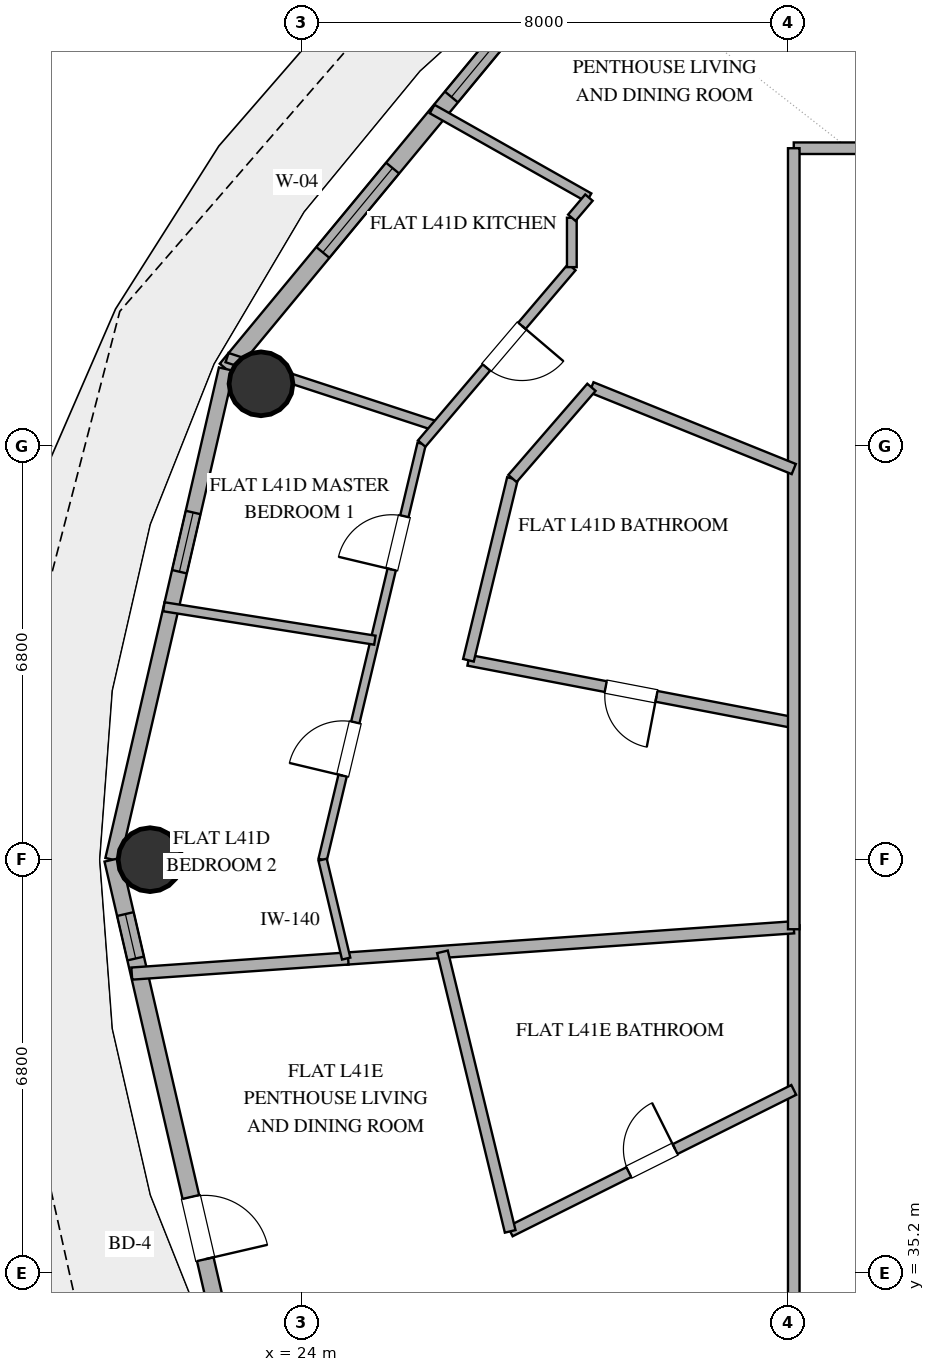
"""IFC4 building model, lengths in metres.
Left out: names, types, materials, properties, quantities, classifications, styles, units other than length and angle.
Written with IfcOpenShell. Run it as: python <this file> out.ifc"""

import sys

from ifc_helpers import new_model, si_unit, direction, frame, frame_2d, origin, origin_2d, place, context, subcontext, project, spatial, rectangle, hollow_circle, extrude, element, fill, save


model = new_model("IFC4")
c1 = context("Model", 3, precision=1e-05, world=origin(), true_north=direction((0.0, 1.0)))
c2 = subcontext(c1, "Body", "Model", "MODEL_VIEW")
j1 = project(units=[si_unit("LENGTHUNIT", "METRE"), si_unit("PLANEANGLEUNIT", "RADIAN")], contexts=[c1])
p1 = place(None, origin())
s1 = spatial("IfcSite", under=j1, at=p1, CompositionType="ELEMENT")
p2 = place(p1, origin())
s2 = spatial("IfcBuilding", under=s1, at=p2, CompositionType="ELEMENT")
p3 = place(p2, frame((0.0, 0.0, 165.0)))
s3 = spatial("IfcBuildingStorey", under=s2, at=p3, CompositionType="ELEMENT", Elevation=165.0)
for number, where, z_axis, x_axis in (
    (1, (23.338, 49.826, 0.0), (0.0, 0.0, 1.0), (1.0, 0.0, 0.0)),
    (2, (21.513, 42.0, 0.0), (0.0, 0.0, 1.0), (1.0, 0.0, 0.0)),
):
    element("IfcColumn", number, at=place(p3, frame(where, z_axis=z_axis, x_axis=x_axis)), inside=s3, PredefinedType="COLUMN", context=c2, shape_type="SweptSolid", body=[
        extrude(hollow_circle(Radius=0.525, WallThickness=0.028, at=origin_2d()), origin(), (0.0, 0.0, 1.0), 3.38),
    ])
p4 = place(p3, frame((28.424, 56.906, 0.0), z_axis=(0.0, 0.0, 1.0), x_axis=(-0.637333477683, -0.770588111915, 0.0)))
e3 = element("IfcWall", 3, at=p4, inside=s3, PredefinedType="SOLIDWALL", context=c2, shape_type="SweptSolid", body=[
    extrude(rectangle(XDim=8.875, YDim=0.28, at=frame_2d((4.438, 0.0))), origin(), (0.0, 0.0, 1.0), 3.38),
])
p5 = place(p4, frame((1.566, 0.0, 0.85)))
e4 = element("IfcOpeningElement", 4, at=p5, cuts=e3, PredefinedType="OPENING", context=c2, shape_type="SweptSolid", body=[
    extrude(rectangle(XDim=1.5, YDim=2.0, at=frame_2d((0.75, 1.0))), frame((0.0, 0.15, 0.0), z_axis=(0.0, -1.0, 0.0), x_axis=(1.0, 0.0, 0.0)), (0.0, 0.0, 1.0), 0.3),
])
p6 = place(p4, frame((4.584, 0.0, 0.85)))
e5 = element("IfcOpeningElement", 5, at=p6, cuts=e3, PredefinedType="OPENING", context=c2, shape_type="SweptSolid", body=[
    extrude(rectangle(XDim=1.8, YDim=2.2, at=frame_2d((0.9, 1.1))), frame((0.0, 0.15, 0.0), z_axis=(0.0, -1.0, 0.0), x_axis=(1.0, 0.0, 0.0)), (0.0, 0.0, 1.0), 0.3),
])
p7 = place(p3, frame((22.768, 50.067, 0.0), z_axis=(0.0, 0.0, 1.0), x_axis=(-0.225473184558, -0.974249374157, 0.0)))
e6 = element("IfcWall", 6, at=p7, inside=s3, PredefinedType="SOLIDWALL", context=c2, shape_type="SweptSolid", body=[
    extrude(rectangle(XDim=8.28, YDim=0.25, at=frame_2d((4.14, 0.0))), origin(), (0.0, 0.0, 1.0), 3.38),
])
p8 = place(p7, frame((2.42, 0.0, 0.35)))
e7 = element("IfcOpeningElement", 7, at=p8, cuts=e6, PredefinedType="OPENING", context=c2, shape_type="SweptSolid", body=[
    extrude(rectangle(XDim=1.0, YDim=1.05, at=frame_2d((0.5, 0.525))), frame((0.0, 0.135, 0.0), z_axis=(0.0, -1.0, 0.0), x_axis=(1.0, 0.0, 0.0)), (0.0, 0.0, 1.0), 0.27),
])
p9 = place(p3, frame((20.901, 42.0, 0.0), z_axis=(0.0, 0.0, 1.0), x_axis=(0.225473184558, -0.974249374157, 0.0)))
e8 = element("IfcWall", 8, at=p9, inside=s3, PredefinedType="SOLIDWALL", context=c2, shape_type="SweptSolid", body=[
    extrude(rectangle(XDim=8.28, YDim=0.28, at=frame_2d((4.14, 0.0))), origin(), (0.0, 0.0, 1.0), 3.38),
])
p10 = place(p9, frame((5.694, 0.0, 0.0)))
e9 = element("IfcOpeningElement", 9, at=p10, cuts=e8, PredefinedType="OPENING", context=c2, shape_type="SweptSolid", body=[
    extrude(rectangle(XDim=1.05, YDim=2.2, at=frame_2d((0.525, 1.1))), frame((0.0, 0.15, 0.0), z_axis=(0.0, -1.0, 0.0), x_axis=(1.0, 0.0, 0.0)), (0.0, 0.0, 1.0), 0.3),
])
p11 = place(p9, frame((0.918, 0.0, 0.85)))
e10 = element("IfcOpeningElement", 10, at=p11, cuts=e8, PredefinedType="OPENING", context=c2, shape_type="SweptSolid", body=[
    extrude(rectangle(XDim=0.75, YDim=1.8, at=frame_2d((0.375, 0.9))), frame((0.0, 0.15, 0.0), z_axis=(0.0, -1.0, 0.0), x_axis=(1.0, 0.0, 0.0)), (0.0, 0.0, 1.0), 0.3),
])
p12 = place(p3, frame((32.1, 53.7, 0.0), z_axis=(0.0, 0.0, 1.0), x_axis=(1.0, 0.0, 0.0)))
e11 = element("IfcWall", 11, at=p12, inside=s3, PredefinedType="PARTITIONING", context=c2, shape_type="SweptSolid", body=[
    extrude(rectangle(XDim=19.477, YDim=0.19, at=frame_2d((9.738, 0.0))), origin(), (0.0, 0.0, 1.0), 2.74),
])
p13 = place(p12, frame((9.923, 0.0, 0.0)))
e12 = element("IfcOpeningElement", 12, at=p13, cuts=e11, PredefinedType="OPENING", context=c2, shape_type="SweptSolid", body=[
    extrude(rectangle(XDim=1.0, YDim=2.2, at=frame_2d((0.5, 1.1))), frame((0.0, 0.105, 0.0), z_axis=(0.0, -1.0, 0.0), x_axis=(1.0, 0.0, 0.0)), (0.0, 0.0, 1.0), 0.21),
])
p14 = place(p12, frame((2.204, 0.0, 0.0)))
e13 = element("IfcOpeningElement", 13, at=p14, cuts=e11, PredefinedType="OPENING", context=c2, shape_type="SweptSolid", body=[
    extrude(rectangle(XDim=1.0, YDim=2.2, at=frame_2d((0.5, 1.1))), frame((0.0, 0.105, 0.0), z_axis=(0.0, -1.0, 0.0), x_axis=(1.0, 0.0, 0.0)), (0.0, 0.0, 1.0), 0.21),
])
p15 = place(p3, frame((32.1, 30.3, 0.0), z_axis=(0.0, 0.0, 1.0), x_axis=(0.0, 1.0, 0.0)))
e14 = element("IfcWall", 14, at=p15, inside=s3, PredefinedType="PARTITIONING", context=c2, shape_type="SweptSolid", body=[
    extrude(rectangle(XDim=10.62, YDim=0.19, at=frame_2d((5.31, 0.0))), origin(), (0.0, 0.0, 1.0), 2.74),
])
p16 = place(p15, frame((3.475, 0.0, 0.0)))
e15 = element("IfcOpeningElement", 15, at=p16, cuts=e14, PredefinedType="OPENING", context=c2, shape_type="SweptSolid", body=[
    extrude(rectangle(XDim=1.0, YDim=2.2, at=frame_2d((0.5, 1.1))), frame((0.0, 0.105, 0.0), z_axis=(0.0, -1.0, 0.0), x_axis=(1.0, 0.0, 0.0)), (0.0, 0.0, 1.0), 0.21),
])
p17 = place(p3, frame((37.465, 53.7, 0.0), z_axis=(0.0, 0.0, 1.0), x_axis=(-0.669128292476, 0.7431469089, 0.0)))
e16 = element("IfcWall", 16, at=p17, inside=s3, PredefinedType="PARTITIONING", context=c2, shape_type="SweptSolid", body=[
    extrude(rectangle(XDim=7.339, YDim=0.2, at=frame_2d((3.669, 0.0))), origin(), (0.0, 0.0, 1.0), 2.74),
])
p18 = place(p3, frame((32.1, 40.888, 0.0), z_axis=(0.0, 0.0, 1.0), x_axis=(-0.997562906323, -0.069772830877, 0.0)))
e17 = element("IfcWall", 17, at=p18, inside=s3, PredefinedType="PARTITIONING", context=c2, shape_type="SweptSolid", body=[
    extrude(rectangle(XDim=7.38, YDim=0.2, at=frame_2d((3.69, 0.0))), origin(), (0.0, 0.0, 1.0), 2.74),
])
p19 = place(p3, frame((32.1, 44.253, 0.0), z_axis=(0.0, 0.0, 1.0), x_axis=(-0.982102846986, 0.188345421878, 0.0)))
e18 = element("IfcWall", 18, at=p19, inside=s3, PredefinedType="PLUMBINGWALL", context=c2, shape_type="SweptSolid", body=[
    extrude(rectangle(XDim=5.448, YDim=0.18, at=frame_2d((2.724, 0.0))), origin(), (0.0, 0.0, 1.0), 2.74),
])
p20 = place(p19, frame((2.299, 0.0, 0.0)))
e19 = element("IfcOpeningElement", 19, at=p20, cuts=e18, PredefinedType="OPENING", context=c2, shape_type="SweptSolid", body=[
    extrude(rectangle(XDim=0.85, YDim=2.1, at=frame_2d((0.425, 1.05))), frame((0.0, 0.1, 0.0), z_axis=(0.0, -1.0, 0.0), x_axis=(1.0, 0.0, 0.0)), (0.0, 0.0, 1.0), 0.2),
])
p21 = place(p3, frame((32.1, 40.856, 0.0), z_axis=(0.0, 0.0, 1.0), x_axis=(0.0, 1.0, 0.0)))
e20 = element("IfcWall", 20, at=p21, inside=s3, PredefinedType="PARTITIONING", context=c2, shape_type="SweptSolid", body=[
    extrude(rectangle(XDim=12.844, YDim=0.19, at=frame_2d((6.422, 0.0))), origin(), (0.0, 0.0, 1.0), 2.74),
])
p22 = place(p3, frame((27.436, 35.887, 0.0), z_axis=(0.0, 0.0, 1.0), x_axis=(0.894857716432, 0.446351506485, 0.0)))
e21 = element("IfcWall", 21, at=p22, inside=s3, PredefinedType="PLUMBINGWALL", context=c2, shape_type="SweptSolid", body=[
    extrude(rectangle(XDim=5.212, YDim=0.18, at=frame_2d((2.606, 0.0))), origin(), (0.0, 0.0, 1.0), 2.74),
])
p23 = place(p22, frame((2.181, 0.0, 0.0)))
e22 = element("IfcOpeningElement", 22, at=p23, cuts=e21, PredefinedType="OPENING", context=c2, shape_type="SweptSolid", body=[
    extrude(rectangle(XDim=0.85, YDim=2.1, at=frame_2d((0.425, 1.05))), frame((0.0, 0.1, 0.0), z_axis=(0.0, -1.0, 0.0), x_axis=(1.0, 0.0, 0.0)), (0.0, 0.0, 1.0), 0.2),
])
p24 = place(p3, frame((26.322, 40.484, 0.0), z_axis=(0.0, 0.0, 1.0), x_axis=(0.235484788327, -0.971878034769, 0.0)))
e23 = element("IfcWall", 23, at=p24, inside=s3, PredefinedType="PLUMBINGWALL", context=c2, shape_type="SweptSolid", body=[
    extrude(rectangle(XDim=4.73, YDim=0.18, at=frame_2d((2.365, 0.0))), origin(), (0.0, 0.0, 1.0), 2.74),
])
p25 = place(p3, frame((24.351, 42.0, 0.0), z_axis=(0.0, 0.0, 1.0), x_axis=(0.231625219966, 0.972805097373, 0.0)))
e24 = element("IfcWall", 24, at=p25, inside=s3, PredefinedType="PARTITIONING", context=c2, shape_type="SweptSolid", body=[
    extrude(rectangle(XDim=7.033, YDim=0.14, at=frame_2d((3.517, 0.0))), origin(), (0.0, 0.0, 1.0), 2.74),
])
p26 = place(p25, frame((1.421, 0.0, 0.0)))
e25 = element("IfcOpeningElement", 25, at=p26, cuts=e24, PredefinedType="OPENING", context=c2, shape_type="SweptSolid", body=[
    extrude(rectangle(XDim=0.9, YDim=2.1, at=frame_2d((0.45, 1.05))), frame((0.0, 0.08, 0.0), z_axis=(0.0, -1.0, 0.0), x_axis=(1.0, 0.0, 0.0)), (0.0, 0.0, 1.0), 0.16),
])
p27 = place(p25, frame((4.906, 0.0, 0.0)))
e26 = element("IfcOpeningElement", 26, at=p27, cuts=e24, PredefinedType="OPENING", context=c2, shape_type="SweptSolid", body=[
    extrude(rectangle(XDim=0.9, YDim=2.1, at=frame_2d((0.45, 1.05))), frame((0.0, 0.08, 0.0), z_axis=(0.0, -1.0, 0.0), x_axis=(1.0, 0.0, 0.0)), (0.0, 0.0, 1.0), 0.16),
])
p28 = place(p3, frame((22.78, 50.257, 0.0), z_axis=(0.0, 0.0, 1.0), x_axis=(0.95036707557, -0.311130875474, 0.0)))
e27 = element("IfcWall", 27, at=p28, inside=s3, PredefinedType="PLUMBINGWALL", context=c2, shape_type="SweptSolid", body=[
    extrude(rectangle(XDim=3.625, YDim=0.16, at=frame_2d((1.812, 0.0))), origin(), (0.0, 0.0, 1.0), 2.74),
])
p29 = place(p3, frame((28.773, 49.768, 0.0), z_axis=(0.0, 0.0, 1.0), x_axis=(0.927195040954, -0.374578904945, 0.0)))
e28 = element("IfcWall", 28, at=p29, inside=s3, PredefinedType="PLUMBINGWALL", context=c2, shape_type="SweptSolid", body=[
    extrude(rectangle(XDim=3.589, YDim=0.18, at=frame_2d((1.794, 0.0))), origin(), (0.0, 0.0, 1.0), 2.74),
])
p30 = place(p3, frame((21.212, 40.127, 0.0), z_axis=(0.0, 0.0, 1.0), x_axis=(0.997565256009, 0.069739228586, 0.0)))
e29 = element("IfcWall", 29, at=p30, inside=s3, PredefinedType="PARTITIONING", context=c2, shape_type="SweptSolid", body=[
    extrude(rectangle(XDim=3.567, YDim=0.2, at=frame_2d((1.784, 0.0))), origin(), (0.0, 0.0, 1.0), 2.74),
])
p31 = place(p3, frame((25.211, 45.61, 0.0), z_axis=(0.0, 0.0, 1.0), x_axis=(-0.987691308322, 0.156415726399, 0.0)))
e30 = element("IfcWall", 30, at=p31, inside=s3, PredefinedType="PARTITIONING", context=c2, shape_type="SweptSolid", body=[
    extrude(rectangle(XDim=3.513, YDim=0.15, at=frame_2d((1.757, 0.0))), origin(), (0.0, 0.0, 1.0), 2.74),
])
p32 = place(p3, frame((28.45, 51.744, 0.0), z_axis=(0.0, 0.0, 1.0), x_axis=(-0.648022171798, -0.761621470849, 0.0)))
e31 = element("IfcWall", 31, at=p32, inside=s3, PredefinedType="PLUMBINGWALL", context=c2, shape_type="SweptSolid", body=[
    extrude(rectangle(XDim=3.81, YDim=0.16, at=frame_2d((1.905, 0.0))), origin(), (0.0, 0.0, 1.0), 2.74),
])
p33 = place(p32, frame((1.267, 0.0, 0.0)))
e32 = element("IfcOpeningElement", 32, at=p33, cuts=e31, PredefinedType="OPENING", context=c2, shape_type="SweptSolid", body=[
    extrude(rectangle(XDim=0.9, YDim=2.1, at=frame_2d((0.45, 1.05))), frame((0.0, 0.09, 0.0), z_axis=(0.0, -1.0, 0.0), x_axis=(1.0, 0.0, 0.0)), (0.0, 0.0, 1.0), 0.18),
])
p34 = place(p3, frame((26.75, 45.279, 0.0), z_axis=(0.0, 0.0, 1.0), x_axis=(0.235525049635, 0.971868278624, 0.0)))
e33 = element("IfcWall", 33, at=p34, inside=s3, PredefinedType="PLUMBINGWALL", context=c2, shape_type="SweptSolid", body=[
    extrude(rectangle(XDim=3.075, YDim=0.18, at=frame_2d((1.538, 0.0))), origin(), (0.0, 0.0, 1.0), 2.74),
])
p35 = place(p3, frame((26.152, 54.345, 0.0), z_axis=(0.0, 0.0, 1.0), x_axis=(0.870631902874, -0.491935046219, 0.0)))
e34 = element("IfcWall", 34, at=p35, inside=s3, PredefinedType="PLUMBINGWALL", context=c2, shape_type="SweptSolid", body=[
    extrude(rectangle(XDim=2.962, YDim=0.16, at=frame_2d((1.481, 0.0))), origin(), (0.0, 0.0, 1.0), 2.74),
])
p36 = place(p3, frame((27.474, 48.268, 0.0), z_axis=(0.0, 0.0, 1.0), x_axis=(0.654593195673, 0.755981314702, 0.0)))
e35 = element("IfcWall", 35, at=p36, inside=s3, PredefinedType="PLUMBINGWALL", context=c2, shape_type="SweptSolid", body=[
    extrude(rectangle(XDim=1.984, YDim=0.18, at=frame_2d((0.992, 0.0))), origin(), (0.0, 0.0, 1.0), 2.74),
])
p37 = place(p3, frame((24.739, 40.373, 0.0), z_axis=(0.0, 0.0, 1.0), x_axis=(-0.231561310927, 0.972820311919, 0.0)))
e36 = element("IfcWall", 36, at=p37, inside=s3, PredefinedType="PARTITIONING", context=c2, shape_type="SweptSolid", body=[
    extrude(rectangle(XDim=1.672, YDim=0.14, at=frame_2d((0.836, 0.0))), origin(), (0.0, 0.0, 1.0), 2.74),
])
p38 = place(p3, frame((28.45, 52.557, 0.0), z_axis=(0.0, 0.0, 1.0), x_axis=(0.0, -1.0, 0.0)))
e37 = element("IfcWall", 37, at=p38, inside=s3, PredefinedType="PLUMBINGWALL", context=c2, shape_type="SweptSolid", body=[
    extrude(rectangle(XDim=0.812, YDim=0.16, at=frame_2d((0.406, 0.0))), origin(), (0.0, 0.0, 1.0), 2.74),
])
p39 = place(p3, frame((28.731, 52.887, 0.0), z_axis=(0.0, 0.0, 1.0), x_axis=(-0.648056208932, -0.761592509196, 0.0)))
e38 = element("IfcWall", 38, at=p39, inside=s3, PredefinedType="PLUMBINGWALL", context=c2, shape_type="SweptSolid", body=[
    extrude(rectangle(XDim=0.434, YDim=0.16, at=frame_2d((0.217, 0.0))), origin(), (0.0, 0.0, 1.0), 2.74),
])
p40 = place(p5, origin())
e39 = element("IfcWindow", 39, at=p40, inside=s3, PartitioningType="SINGLE_PANEL", PredefinedType="WINDOW", context=c2, shape_type="SweptSolid", body=[
    extrude(rectangle(XDim=1.5, YDim=2.0, at=frame_2d((0.75, 1.0))), frame((0.0, 0.03, 0.0), z_axis=(0.0, -1.0, 0.0), x_axis=(1.0, 0.0, 0.0)), (0.0, 0.0, 1.0), 0.06),
])
fill(e4, e39)
p41 = place(p6, origin())
e40 = element("IfcWindow", 40, at=p41, inside=s3, PartitioningType="SINGLE_PANEL", PredefinedType="WINDOW", context=c2, shape_type="SweptSolid", body=[
    extrude(rectangle(XDim=1.8, YDim=2.2, at=frame_2d((0.9, 1.1))), frame((0.0, 0.03, 0.0), z_axis=(0.0, -1.0, 0.0), x_axis=(1.0, 0.0, 0.0)), (0.0, 0.0, 1.0), 0.06),
])
fill(e5, e40)
p42 = place(p10, origin())
e41 = element("IfcDoor", 41, at=p42, inside=s3, OperationType="SINGLE_SWING_RIGHT", PredefinedType="DOOR", context=c2, shape_type="SweptSolid", body=[
    extrude(rectangle(XDim=1.05, YDim=2.2, at=frame_2d((0.525, 1.1))), frame((0.0, 0.025, 0.0), z_axis=(0.0, -1.0, 0.0), x_axis=(1.0, 0.0, 0.0)), (0.0, 0.0, 1.0), 0.05),
])
fill(e9, e41)
p43 = place(p8, origin())
e42 = element("IfcWindow", 42, at=p43, inside=s3, PartitioningType="SINGLE_PANEL", PredefinedType="WINDOW", context=c2, shape_type="SweptSolid", body=[
    extrude(rectangle(XDim=1.0, YDim=1.05, at=frame_2d((0.5, 0.525))), frame((0.0, 0.03, 0.0), z_axis=(0.0, -1.0, 0.0), x_axis=(1.0, 0.0, 0.0)), (0.0, 0.0, 1.0), 0.06),
])
fill(e7, e42)
p44 = place(p11, origin())
e43 = element("IfcWindow", 43, at=p44, inside=s3, PartitioningType="SINGLE_PANEL", PredefinedType="WINDOW", context=c2, shape_type="SweptSolid", body=[
    extrude(rectangle(XDim=0.75, YDim=1.8, at=frame_2d((0.375, 0.9))), frame((0.0, 0.03, 0.0), z_axis=(0.0, -1.0, 0.0), x_axis=(1.0, 0.0, 0.0)), (0.0, 0.0, 1.0), 0.06),
])
fill(e10, e43)
p45 = place(p20, origin())
e44 = element("IfcDoor", 44, at=p45, inside=s3, OperationType="SINGLE_SWING_LEFT", PredefinedType="DOOR", context=c2, shape_type="SweptSolid", body=[
    extrude(rectangle(XDim=0.85, YDim=2.1, at=frame_2d((0.425, 1.05))), frame((0.0, 0.025, 0.0), z_axis=(0.0, -1.0, 0.0), x_axis=(1.0, 0.0, 0.0)), (0.0, 0.0, 1.0), 0.05),
])
fill(e19, e44)
p46 = place(p23, origin())
e45 = element("IfcDoor", 45, at=p46, inside=s3, OperationType="SINGLE_SWING_RIGHT", PredefinedType="DOOR", context=c2, shape_type="SweptSolid", body=[
    extrude(rectangle(XDim=0.85, YDim=2.1, at=frame_2d((0.425, 1.05))), frame((0.0, 0.025, 0.0), z_axis=(0.0, -1.0, 0.0), x_axis=(1.0, 0.0, 0.0)), (0.0, 0.0, 1.0), 0.05),
])
fill(e22, e45)
p47 = place(p26, origin())
e46 = element("IfcDoor", 46, at=p47, inside=s3, OperationType="SINGLE_SWING_LEFT", PredefinedType="DOOR", context=c2, shape_type="SweptSolid", body=[
    extrude(rectangle(XDim=0.9, YDim=2.1, at=frame_2d((0.45, 1.05))), frame((0.0, 0.025, 0.0), z_axis=(0.0, -1.0, 0.0), x_axis=(1.0, 0.0, 0.0)), (0.0, 0.0, 1.0), 0.05),
])
fill(e25, e46)
p48 = place(p27, origin())
e47 = element("IfcDoor", 47, at=p48, inside=s3, OperationType="SINGLE_SWING_LEFT", PredefinedType="DOOR", context=c2, shape_type="SweptSolid", body=[
    extrude(rectangle(XDim=0.9, YDim=2.1, at=frame_2d((0.45, 1.05))), frame((0.0, 0.025, 0.0), z_axis=(0.0, -1.0, 0.0), x_axis=(1.0, 0.0, 0.0)), (0.0, 0.0, 1.0), 0.05),
])
fill(e26, e47)
p49 = place(p33, origin())
e48 = element("IfcDoor", 48, at=p49, inside=s3, OperationType="SINGLE_SWING_LEFT", PredefinedType="DOOR", context=c2, shape_type="SweptSolid", body=[
    extrude(rectangle(XDim=0.9, YDim=2.1, at=frame_2d((0.45, 1.05))), frame((0.0, 0.025, 0.0), z_axis=(0.0, -1.0, 0.0), x_axis=(1.0, 0.0, 0.0)), (0.0, 0.0, 1.0), 0.05),
])
fill(e32, e48)
save(model, sys.argv[1])
